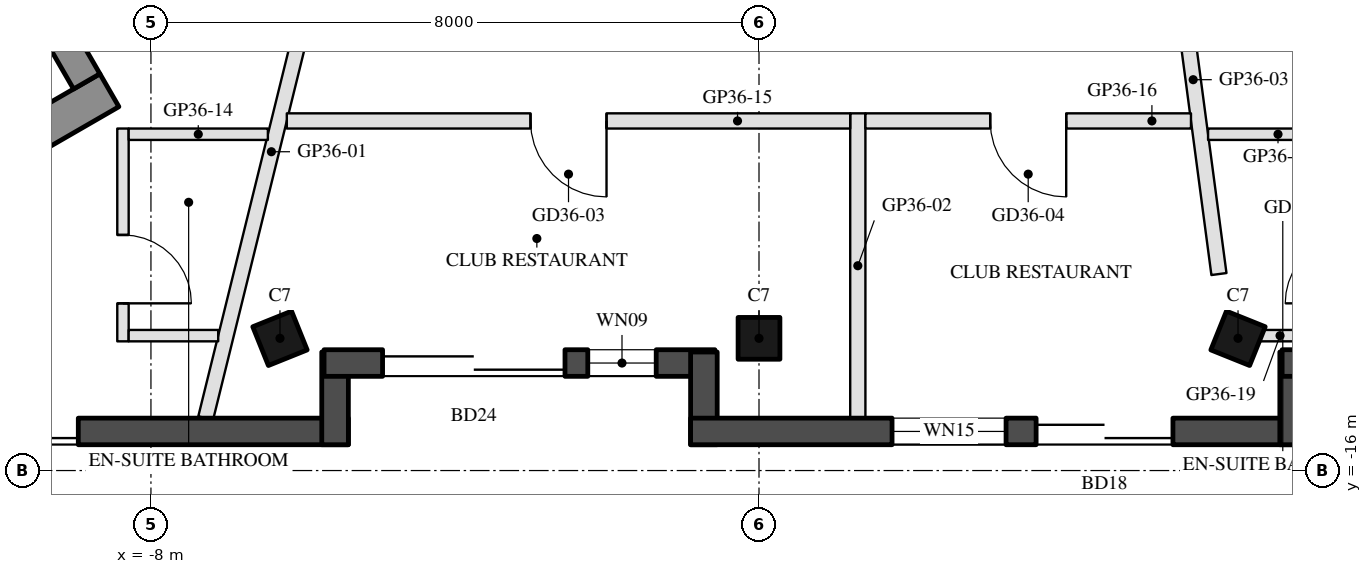
"""IFC4 building model, lengths in metres.
Left out: names, types, materials, properties, quantities, classifications, styles, units other than length and angle.
Written with IfcOpenShell. Run it as: python <this file> out.ifc"""

import sys

from ifc_helpers import new_model, si_unit, direction, frame, frame_2d, origin, origin_2d, place, context, subcontext, project, spatial, rectangle, hollow_rectangle, extrude, boolean, halfspace, element, fill, save


model = new_model("IFC4")
c1 = context("Model", 3, precision=1e-05, world=origin(), true_north=direction((0.0, 1.0)))
c2 = subcontext(c1, "Body", "Model", "MODEL_VIEW")
j1 = project(units=[si_unit("LENGTHUNIT", "METRE"), si_unit("PLANEANGLEUNIT", "RADIAN")], contexts=[c1])
p1 = place(None, origin())
s1 = spatial("IfcSite", under=j1, at=p1, CompositionType="ELEMENT")
p2 = place(p1, origin())
s2 = spatial("IfcBuilding", under=s1, at=p2, CompositionType="ELEMENT")
p3 = place(p2, frame((0.0, 0.0, 328.1)))
s3 = spatial("IfcBuildingStorey", under=s2, at=p3, CompositionType="ELEMENT", Elevation=328.1)
p4 = place(p3, frame((-6.302, -14.26, 0.0), z_axis=(0.060870463553, 0.151232178432, 0.986622326361), x_axis=(-0.99813528898, 0.004713590867, 0.06085825296)))
e1 = element("IfcColumn", 1, at=p4, inside=s3, PredefinedType="COLUMN", context=c2, shape_type="SweptSolid", body=[
    boolean("DIFFERENCE", boolean("DIFFERENCE", extrude(hollow_rectangle(XDim=0.55, YDim=0.55, WallThickness=0.025, at=origin_2d()), origin(), (0.0, 0.0, 1.0), 3.75), halfspace(frame((0.0, 0.0, 0.034), z_axis=(0.0, 0.0, 1.0), x_axis=(1.0, 0.0, 0.0)), True)), halfspace(frame((0.0, 0.0, 3.735), z_axis=(0.0, 0.0, 1.0), x_axis=(1.0, 0.0, 0.0)), False)),
])
p5 = place(p3, frame((0.0, -14.26, 0.0), z_axis=(0.0, 0.151513133163, 0.98845524455), x_axis=(-1.0, 0.0, 0.0)))
e2 = element("IfcColumn", 2, at=p5, inside=s3, PredefinedType="COLUMN", context=c2, shape_type="SweptSolid", body=[
    boolean("DIFFERENCE", boolean("DIFFERENCE", extrude(hollow_rectangle(XDim=0.55, YDim=0.55, WallThickness=0.025, at=origin_2d()), origin(), (0.0, 0.0, 1.0), 3.743), halfspace(frame((0.0, 0.0, 0.031), z_axis=(0.0, 0.0, 1.0), x_axis=(1.0, 0.0, 0.0)), True)), halfspace(frame((0.0, 0.0, 3.729), z_axis=(0.0, 0.0, 1.0), x_axis=(1.0, 0.0, 0.0)), False)),
])
p6 = place(p3, frame((6.302, -14.26, 0.0), z_axis=(-0.060870463553, 0.151232178432, 0.986622326361), x_axis=(0.99813528898, 0.004713590867, 0.06085825296)))
e3 = element("IfcColumn", 3, at=p6, inside=s3, PredefinedType="COLUMN", context=c2, shape_type="SweptSolid", body=[
    boolean("DIFFERENCE", boolean("DIFFERENCE", extrude(hollow_rectangle(XDim=0.55, YDim=0.55, WallThickness=0.025, at=origin_2d()), origin(), (0.0, 0.0, 1.0), 3.75), halfspace(frame((0.0, 0.0, 0.034), z_axis=(0.0, 0.0, 1.0), x_axis=(1.0, 0.0, 0.0)), True)), halfspace(frame((0.0, 0.0, 3.735), z_axis=(0.0, 0.0, 1.0), x_axis=(1.0, 0.0, 0.0)), False)),
])
p7 = place(p3, frame((-15.011, -15.485, 0.0), z_axis=(0.0, 0.0, 1.0), x_axis=(1.0, 0.0, 0.0)))
e4 = element("IfcWall", 4, at=p7, inside=s3, PredefinedType="SOLIDWALL", context=c2, shape_type="SweptSolid", body=[
    extrude(rectangle(XDim=9.608, YDim=0.35, at=frame_2d((4.804, 0.0))), origin(), (0.0, 0.0, 1.0), 3.45),
])
p8 = place(p7, frame((0.45, 0.0, 0.3)))
e5 = element("IfcOpeningElement", 5, at=p8, cuts=e4, PredefinedType="OPENING", context=c2, shape_type="SweptSolid", body=[
    extrude(rectangle(XDim=1.4, YDim=2.65, at=frame_2d((0.7, 1.325))), frame((0.0, 0.185, 0.0), z_axis=(0.0, -1.0, 0.0), x_axis=(1.0, 0.0, 0.0)), (0.0, 0.0, 1.0), 0.37),
])
p9 = place(p7, frame((3.655, 0.0, 0.0)))
e6 = element("IfcOpeningElement", 6, at=p9, cuts=e4, PredefinedType="OPENING", context=c2, shape_type="SweptSolid", body=[
    extrude(rectangle(XDim=2.4, YDim=2.4, at=frame_2d((1.2, 1.2))), frame((0.0, 0.185, 0.0), z_axis=(0.0, -1.0, 0.0), x_axis=(1.0, 0.0, 0.0)), (0.0, 0.0, 1.0), 0.37),
])
p10 = place(p3, frame((-5.577, -15.66, 0.0), z_axis=(0.0, 0.0, 1.0), x_axis=(0.0, 1.0, 0.0)))
e7 = element("IfcWall", 7, at=p10, inside=s3, PredefinedType="SOLIDWALL", context=c2, shape_type="SweptSolid", body=[
    extrude(rectangle(XDim=1.22, YDim=0.35, at=frame_2d((0.61, 0.0))), origin(), (0.0, 0.0, 1.0), 3.45),
])
p11 = place(p3, frame((-5.722, -14.585, 0.0), z_axis=(0.0, 0.0, 1.0), x_axis=(1.0, 0.0, 0.0)))
e8 = element("IfcWall", 8, at=p11, inside=s3, PredefinedType="SOLIDWALL", context=c2, shape_type="SweptSolid", body=[
    extrude(rectangle(XDim=5.142, YDim=0.35, at=frame_2d((2.571, 0.0))), origin(), (0.0, 0.0, 1.0), 3.45),
])
p12 = place(p11, frame((0.77, 0.0, 0.0)))
e9 = element("IfcOpeningElement", 9, at=p12, cuts=e8, PredefinedType="OPENING", context=c2, shape_type="SweptSolid", body=[
    extrude(rectangle(XDim=2.4, YDim=2.4, at=frame_2d((1.2, 1.2))), frame((0.0, 0.185, 0.0), z_axis=(0.0, -1.0, 0.0), x_axis=(1.0, 0.0, 0.0)), (0.0, 0.0, 1.0), 0.37),
])
p13 = place(p11, frame((3.47, 0.0, 0.3)))
e10 = element("IfcOpeningElement", 10, at=p13, cuts=e8, PredefinedType="OPENING", context=c2, shape_type="SweptSolid", body=[
    extrude(rectangle(XDim=0.9, YDim=2.65, at=frame_2d((0.45, 1.325))), frame((0.0, 0.185, 0.0), z_axis=(0.0, -1.0, 0.0), x_axis=(1.0, 0.0, 0.0)), (0.0, 0.0, 1.0), 0.37),
])
p14 = place(p3, frame((-0.725, -14.44, 0.0), z_axis=(0.0, 0.0, 1.0), x_axis=(0.0, -1.0, 0.0)))
e11 = element("IfcWall", 11, at=p14, inside=s3, PredefinedType="SOLIDWALL", context=c2, shape_type="SweptSolid", body=[
    extrude(rectangle(XDim=1.22, YDim=0.35, at=frame_2d((0.61, 0.0))), origin(), (0.0, 0.0, 1.0), 3.45),
])
p15 = place(p3, frame((-0.9, -15.485, 0.0), z_axis=(0.0, 0.0, 1.0), x_axis=(1.0, 0.0, 0.0)))
e12 = element("IfcWall", 12, at=p15, inside=s3, PredefinedType="SOLIDWALL", context=c2, shape_type="SweptSolid", body=[
    extrude(rectangle(XDim=8.102, YDim=0.35, at=frame_2d((4.051, 0.0))), origin(), (0.0, 0.0, 1.0), 3.45),
])
p16 = place(p15, frame((4.546, 0.0, 0.0)))
e13 = element("IfcOpeningElement", 13, at=p16, cuts=e12, PredefinedType="OPENING", context=c2, shape_type="SweptSolid", body=[
    extrude(rectangle(XDim=1.8, YDim=2.4, at=frame_2d((0.9, 1.2))), frame((0.0, 0.185, 0.0), z_axis=(0.0, -1.0, 0.0), x_axis=(1.0, 0.0, 0.0)), (0.0, 0.0, 1.0), 0.37),
])
p17 = place(p15, frame((2.65, 0.0, 0.3)))
e14 = element("IfcOpeningElement", 14, at=p17, cuts=e12, PredefinedType="OPENING", context=c2, shape_type="SweptSolid", body=[
    extrude(rectangle(XDim=1.5, YDim=2.65, at=frame_2d((0.75, 1.325))), frame((0.0, 0.185, 0.0), z_axis=(0.0, -1.0, 0.0), x_axis=(1.0, 0.0, 0.0)), (0.0, 0.0, 1.0), 0.37),
])
p18 = place(p3, frame((7.027, -15.66, 0.0), z_axis=(0.0, 0.0, 1.0), x_axis=(0.0, 1.0, 0.0)))
e15 = element("IfcWall", 15, at=p18, inside=s3, PredefinedType="SOLIDWALL", context=c2, shape_type="SweptSolid", body=[
    extrude(rectangle(XDim=1.22, YDim=0.35, at=frame_2d((0.61, 0.0))), origin(), (0.0, 0.0, 1.0), 3.45),
])
p19 = place(p3, frame((6.882, -14.585, 0.0), z_axis=(0.0, 0.0, 1.0), x_axis=(1.0, 0.0, 0.0)))
e16 = element("IfcWall", 16, at=p19, inside=s3, PredefinedType="SOLIDWALL", context=c2, shape_type="SweptSolid", body=[
    extrude(rectangle(XDim=5.143, YDim=0.35, at=frame_2d((2.571, 0.0))), origin(), (0.0, 0.0, 1.0), 3.45),
])
p20 = place(p19, frame((1.894, 0.0, 0.0)))
e17 = element("IfcOpeningElement", 17, at=p20, cuts=e16, PredefinedType="OPENING", context=c2, shape_type="SweptSolid", body=[
    extrude(rectangle(XDim=2.4, YDim=2.4, at=frame_2d((1.2, 1.2))), frame((0.0, 0.185, 0.0), z_axis=(0.0, -1.0, 0.0), x_axis=(1.0, 0.0, 0.0)), (0.0, 0.0, 1.0), 0.37),
])
p21 = place(p3, frame((-8.547, -10.997, 0.0), z_axis=(0.0, 0.0, 1.0), x_axis=(-0.866031306094, -0.49998977676, 0.0)))
e18 = element("IfcWall", 18, at=p21, inside=s3, PredefinedType="SHEAR", context=c2, shape_type="SweptSolid", body=[
    extrude(rectangle(XDim=4.084, YDim=0.5, at=frame_2d((2.042, 0.0))), origin(), (0.0, 0.0, 1.0), 3.45),
])
p22 = place(p3, frame((-13.845, -2.22, 0.0), z_axis=(0.0, 0.0, 1.0), x_axis=(0.500004234368, -0.866022959057, 0.0)))
e19 = element("IfcWall", 19, at=p22, inside=s3, PredefinedType="SHEAR", context=c2, shape_type="SweptSolid", body=[
    extrude(rectangle(XDim=10.0, YDim=0.4, at=frame_2d((5.0, 0.0))), origin(), (0.0, 0.0, 1.0), 3.45),
])
p23 = place(p22, frame((3.55, 0.0, 0.0)))
e20 = element("IfcOpeningElement", 20, at=p23, cuts=e19, PredefinedType="OPENING", context=c2, shape_type="SweptSolid", body=[
    extrude(rectangle(XDim=1.1, YDim=2.1, at=frame_2d((0.55, 1.05))), frame((0.0, 0.21, 0.0), z_axis=(0.0, -1.0, 0.0), x_axis=(1.0, 0.0, 0.0)), (0.0, 0.0, 1.0), 0.42),
])
p24 = place(p22, frame((5.85, 0.0, 0.0)))
e21 = element("IfcOpeningElement", 21, at=p24, cuts=e19, PredefinedType="OPENING", context=c2, shape_type="SweptSolid", body=[
    extrude(rectangle(XDim=1.4, YDim=2.1, at=frame_2d((0.7, 1.05))), frame((0.0, 0.21, 0.0), z_axis=(0.0, -1.0, 0.0), x_axis=(1.0, 0.0, 0.0)), (0.0, 0.0, 1.0), 0.42),
])
p25 = place(p3, frame((-7.28, -15.31, 0.0), z_axis=(0.0, 0.0, 1.0), x_axis=(0.239495270955, 0.970897530736, 0.0)))
e22 = element("IfcWall", 22, at=p25, inside=s3, PredefinedType="PARTITIONING", context=c2, shape_type="SweptSolid", body=[
    extrude(rectangle(XDim=7.22, YDim=0.2, at=frame_2d((3.61, 0.0))), origin(), (0.0, 0.0, 1.0), 3.05),
])
p26 = place(p3, frame((1.3, -15.31, 0.0), z_axis=(0.0, 0.0, 1.0), x_axis=(0.0, 1.0, 0.0)))
e23 = element("IfcWall", 23, at=p26, inside=s3, PredefinedType="PARTITIONING", context=c2, shape_type="SweptSolid", body=[
    extrude(rectangle(XDim=4.01, YDim=0.2, at=frame_2d((2.005, 0.0))), origin(), (0.0, 0.0, 1.0), 3.05),
])
p27 = place(p3, frame((6.051, -13.415, 0.0), z_axis=(0.0, 0.0, 1.0), x_axis=(-0.131363967537, 0.991334206024, 0.0)))
e24 = element("IfcWall", 24, at=p27, inside=s3, PredefinedType="PARTITIONING", context=c2, shape_type="SweptSolid", body=[
    extrude(rectangle(XDim=5.159, YDim=0.2, at=frame_2d((2.58, 0.0))), origin(), (0.0, 0.0, 1.0), 3.05),
])
p28 = place(p3, frame((-8.368, -11.5, 0.0), z_axis=(0.0, 0.0, 1.0), x_axis=(0.0, -1.0, 0.0)))
e25 = element("IfcWall", 25, at=p28, inside=s3, PredefinedType="PARTITIONING", context=c2, shape_type="SweptSolid", body=[
    extrude(rectangle(XDim=2.8, YDim=0.15, at=frame_2d((1.4, 0.0))), origin(), (0.0, 0.0, 1.0), 3.05),
])
p29 = place(p28, frame((1.4, 0.0, 0.0)))
e26 = element("IfcOpeningElement", 26, at=p29, cuts=e25, PredefinedType="OPENING", context=c2, shape_type="SweptSolid", body=[
    extrude(rectangle(XDim=0.9, YDim=2.1, at=frame_2d((0.45, 1.05))), frame((0.0, 0.085, 0.0), z_axis=(0.0, -1.0, 0.0), x_axis=(1.0, 0.0, 0.0)), (0.0, 0.0, 1.0), 0.17),
])
p30 = place(p3, frame((-8.293, -14.225, 0.0), z_axis=(0.0, 0.0, 1.0), x_axis=(1.0, 0.0, 0.0)))
e27 = element("IfcWall", 27, at=p30, inside=s3, PredefinedType="PARTITIONING", context=c2, shape_type="SweptSolid", body=[
    extrude(rectangle(XDim=1.178, YDim=0.15, at=frame_2d((0.589, 0.0))), origin(), (0.0, 0.0, 1.0), 3.45),
])
p31 = place(p3, frame((-8.293, -11.575, 0.0), z_axis=(0.0, 0.0, 1.0), x_axis=(1.0, 0.0, 0.0)))
e28 = element("IfcWall", 28, at=p31, inside=s3, PredefinedType="PARTITIONING", context=c2, shape_type="SweptSolid", body=[
    extrude(rectangle(XDim=1.832, YDim=0.15, at=frame_2d((0.916, 0.0))), origin(), (0.0, 0.0, 1.0), 3.45),
])
p32 = place(p3, frame((1.2, -11.4, 0.0), z_axis=(0.0, 0.0, 1.0), x_axis=(-1.0, 0.0, 0.0)))
e29 = element("IfcWall", 29, at=p32, inside=s3, PredefinedType="PARTITIONING", context=c2, shape_type="SweptSolid", body=[
    extrude(rectangle(XDim=7.412, YDim=0.2, at=frame_2d((3.706, 0.0))), origin(), (0.0, 0.0, 1.0), 3.05),
])
p33 = place(p32, frame((3.206, 0.0, 0.0)))
e30 = element("IfcOpeningElement", 30, at=p33, cuts=e29, PredefinedType="OPENING", context=c2, shape_type="SweptSolid", body=[
    extrude(rectangle(XDim=1.0, YDim=2.1, at=frame_2d((0.5, 1.05))), frame((0.0, 0.11, 0.0), z_axis=(0.0, -1.0, 0.0), x_axis=(1.0, 0.0, 0.0)), (0.0, 0.0, 1.0), 0.22),
])
p34 = place(p3, frame((5.683, -11.4, 0.0), z_axis=(0.0, 0.0, 1.0), x_axis=(-1.0, 0.0, 0.0)))
e31 = element("IfcWall", 31, at=p34, inside=s3, PredefinedType="PARTITIONING", context=c2, shape_type="SweptSolid", body=[
    extrude(rectangle(XDim=4.283, YDim=0.2, at=frame_2d((2.142, 0.0))), origin(), (0.0, 0.0, 1.0), 3.05),
])
p35 = place(p34, frame((1.642, 0.0, 0.0)))
e32 = element("IfcOpeningElement", 32, at=p35, cuts=e31, PredefinedType="OPENING", context=c2, shape_type="SweptSolid", body=[
    extrude(rectangle(XDim=1.0, YDim=2.1, at=frame_2d((0.5, 1.05))), frame((0.0, 0.11, 0.0), z_axis=(0.0, -1.0, 0.0), x_axis=(1.0, 0.0, 0.0)), (0.0, 0.0, 1.0), 0.22),
])
p36 = place(p3, frame((6.26, -14.225, 0.0), z_axis=(0.0, 0.0, 1.0), x_axis=(1.0, 0.0, 0.0)))
e33 = element("IfcWall", 33, at=p36, inside=s3, PredefinedType="PARTITIONING", context=c2, shape_type="SweptSolid", body=[
    extrude(rectangle(XDim=1.489, YDim=0.15, at=frame_2d((0.744, 0.0))), origin(), (0.0, 0.0, 1.0), 3.45),
])
p37 = place(p3, frame((5.908, -11.575, 0.0), z_axis=(0.0, 0.0, 1.0), x_axis=(1.0, 0.0, 0.0)))
e34 = element("IfcWall", 34, at=p37, inside=s3, PredefinedType="PARTITIONING", context=c2, shape_type="SweptSolid", body=[
    extrude(rectangle(XDim=1.84, YDim=0.15, at=frame_2d((0.92, 0.0))), origin(), (0.0, 0.0, 1.0), 3.05),
])
p38 = place(p9, frame((2.4, 0.0, 0.0), z_axis=(0.0, 0.0, 1.0), x_axis=(-1.0, 0.0, 0.0)))
e35 = element("IfcDoor", 35, at=p38, inside=s3, OperationType="SLIDING_TO_LEFT", PredefinedType="DOOR", context=c2, shape_type="SweptSolid", body=[
    extrude(rectangle(XDim=2.4, YDim=2.4, at=frame_2d((1.2, 1.2))), frame((0.0, 0.025, 0.0), z_axis=(0.0, -1.0, 0.0), x_axis=(1.0, 0.0, 0.0)), (0.0, 0.0, 1.0), 0.05),
])
fill(e6, e35)
p39 = place(p12, frame((2.4, 0.0, 0.0), z_axis=(0.0, 0.0, 1.0), x_axis=(-1.0, 0.0, 0.0)))
e36 = element("IfcDoor", 36, at=p39, inside=s3, OperationType="SLIDING_TO_LEFT", PredefinedType="DOOR", context=c2, shape_type="SweptSolid", body=[
    extrude(rectangle(XDim=2.4, YDim=2.4, at=frame_2d((1.2, 1.2))), frame((0.0, 0.025, 0.0), z_axis=(0.0, -1.0, 0.0), x_axis=(1.0, 0.0, 0.0)), (0.0, 0.0, 1.0), 0.05),
])
fill(e9, e36)
p40 = place(p13, origin())
e37 = element("IfcWindow", 37, at=p40, inside=s3, PartitioningType="SINGLE_PANEL", PredefinedType="WINDOW", context=c2, shape_type="SweptSolid", body=[
    extrude(rectangle(XDim=0.9, YDim=2.65, at=frame_2d((0.45, 1.325))), frame((0.0, 0.03, 0.0), z_axis=(0.0, -1.0, 0.0), x_axis=(1.0, 0.0, 0.0)), (0.0, 0.0, 1.0), 0.06),
])
fill(e10, e37)
p41 = place(p16, frame((1.8, 0.0, 0.0), z_axis=(0.0, 0.0, 1.0), x_axis=(-1.0, 0.0, 0.0)))
e38 = element("IfcDoor", 38, at=p41, inside=s3, OperationType="SLIDING_TO_LEFT", PredefinedType="DOOR", context=c2, shape_type="SweptSolid", body=[
    extrude(rectangle(XDim=1.8, YDim=2.4, at=frame_2d((0.9, 1.2))), frame((0.0, 0.025, 0.0), z_axis=(0.0, -1.0, 0.0), x_axis=(1.0, 0.0, 0.0)), (0.0, 0.0, 1.0), 0.05),
])
fill(e13, e38)
p42 = place(p17, origin())
e39 = element("IfcWindow", 39, at=p42, inside=s3, PartitioningType="SINGLE_PANEL", PredefinedType="WINDOW", context=c2, shape_type="SweptSolid", body=[
    extrude(rectangle(XDim=1.5, YDim=2.65, at=frame_2d((0.75, 1.325))), frame((0.0, 0.03, 0.0), z_axis=(0.0, -1.0, 0.0), x_axis=(1.0, 0.0, 0.0)), (0.0, 0.0, 1.0), 0.06),
])
fill(e14, e39)
p43 = place(p29, origin())
e40 = element("IfcDoor", 40, at=p43, inside=s3, OperationType="SINGLE_SWING_RIGHT", PredefinedType="DOOR", context=c2, shape_type="SweptSolid", body=[
    extrude(rectangle(XDim=0.9, YDim=2.1, at=frame_2d((0.45, 1.05))), frame((0.0, 0.025, 0.0), z_axis=(0.0, -1.0, 0.0), x_axis=(1.0, 0.0, 0.0)), (0.0, 0.0, 1.0), 0.05),
])
fill(e26, e40)
p44 = place(p33, origin())
e41 = element("IfcDoor", 41, at=p44, inside=s3, OperationType="SINGLE_SWING_LEFT", PredefinedType="DOOR", context=c2, shape_type="SweptSolid", body=[
    extrude(rectangle(XDim=1.0, YDim=2.1, at=frame_2d((0.5, 1.05))), frame((0.0, 0.025, 0.0), z_axis=(0.0, -1.0, 0.0), x_axis=(1.0, 0.0, 0.0)), (0.0, 0.0, 1.0), 0.05),
])
fill(e30, e41)
p45 = place(p35, origin())
e42 = element("IfcDoor", 42, at=p45, inside=s3, OperationType="SINGLE_SWING_LEFT", PredefinedType="DOOR", context=c2, shape_type="SweptSolid", body=[
    extrude(rectangle(XDim=1.0, YDim=2.1, at=frame_2d((0.5, 1.05))), frame((0.0, 0.025, 0.0), z_axis=(0.0, -1.0, 0.0), x_axis=(1.0, 0.0, 0.0)), (0.0, 0.0, 1.0), 0.05),
])
fill(e32, e42)
save(model, sys.argv[1])
